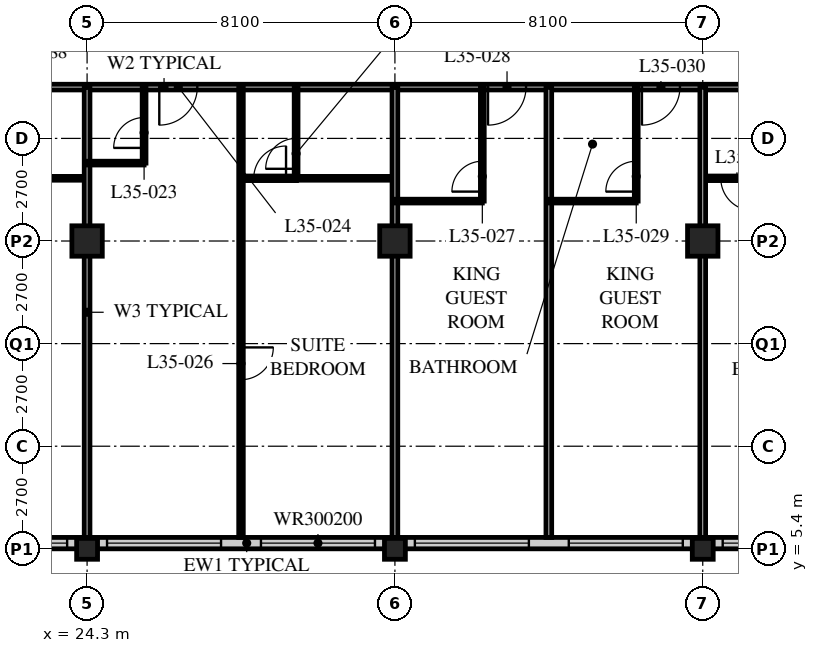
"""IFC4 building model, lengths in metres.
Left out: names, types, materials, properties, quantities, classifications, styles, units other than length and angle.
Written with IfcOpenShell. Run it as: python <this file> out.ifc"""

import sys

from ifc_helpers import new_model, si_unit, direction, frame, frame_2d, origin, origin_2d, place, context, subcontext, project, spatial, rectangle, hollow_rectangle, extrude, element, fill, save


model = new_model("IFC4")
c1 = context("Model", 3, precision=1e-05, world=origin(), true_north=direction((0.0, 1.0)))
c2 = subcontext(c1, "Body", "Model", "MODEL_VIEW")
j1 = project(units=[si_unit("LENGTHUNIT", "METRE"), si_unit("PLANEANGLEUNIT", "RADIAN")], contexts=[c1])
p1 = place(None, origin())
s1 = spatial("IfcSite", under=j1, at=p1, CompositionType="ELEMENT")
p2 = place(p1, origin())
s2 = spatial("IfcBuilding", under=s1, at=p2, CompositionType="ELEMENT")
p3 = place(p2, frame((0.0, 0.0, 137.4)))
s3 = spatial("IfcBuildingStorey", under=s2, at=p3, CompositionType="ELEMENT", Elevation=137.4)
p4 = place(p3, frame((24.3, 5.4, 0.0), z_axis=(0.0, 0.0, 1.0), x_axis=(1.0, 0.0, 0.0)))
e1 = element("IfcColumn", 1, at=p4, inside=s3, PredefinedType="COLUMN", context=c2, shape_type="SweptSolid", body=[
    extrude(hollow_rectangle(XDim=0.55, YDim=0.55, WallThickness=0.04, at=origin_2d()), origin(), (0.0, 0.0, 1.0), 3.4),
])
p5 = place(p3, frame((24.3, 13.5, 0.0), z_axis=(0.0, 0.0, 1.0), x_axis=(1.0, 0.0, 0.0)))
e2 = element("IfcColumn", 2, at=p5, inside=s3, PredefinedType="COLUMN", context=c2, shape_type="SweptSolid", body=[
    extrude(hollow_rectangle(XDim=0.8, YDim=0.8, WallThickness=0.08, at=origin_2d()), origin(), (0.0, 0.0, 1.0), 3.4),
])
p6 = place(p3, frame((32.4, 5.4, 0.0), z_axis=(0.0, 0.0, 1.0), x_axis=(1.0, 0.0, 0.0)))
e3 = element("IfcColumn", 3, at=p6, inside=s3, PredefinedType="COLUMN", context=c2, shape_type="SweptSolid", body=[
    extrude(hollow_rectangle(XDim=0.55, YDim=0.55, WallThickness=0.04, at=origin_2d()), origin(), (0.0, 0.0, 1.0), 3.4),
])
p7 = place(p3, frame((32.4, 13.5, 0.0), z_axis=(0.0, 0.0, 1.0), x_axis=(1.0, 0.0, 0.0)))
e4 = element("IfcColumn", 4, at=p7, inside=s3, PredefinedType="COLUMN", context=c2, shape_type="SweptSolid", body=[
    extrude(hollow_rectangle(XDim=0.8, YDim=0.8, WallThickness=0.08, at=origin_2d()), origin(), (0.0, 0.0, 1.0), 3.4),
])
p8 = place(p3, frame((40.5, 5.4, 0.0), z_axis=(0.0, 0.0, 1.0), x_axis=(1.0, 0.0, 0.0)))
e5 = element("IfcColumn", 5, at=p8, inside=s3, PredefinedType="COLUMN", context=c2, shape_type="SweptSolid", body=[
    extrude(hollow_rectangle(XDim=0.55, YDim=0.55, WallThickness=0.04, at=origin_2d()), origin(), (0.0, 0.0, 1.0), 3.4),
])
p9 = place(p3, frame((40.5, 13.5, 0.0), z_axis=(0.0, 0.0, 1.0), x_axis=(1.0, 0.0, 0.0)))
e6 = element("IfcColumn", 6, at=p9, inside=s3, PredefinedType="COLUMN", context=c2, shape_type="SweptSolid", body=[
    extrude(hollow_rectangle(XDim=0.8, YDim=0.8, WallThickness=0.08, at=origin_2d()), origin(), (0.0, 0.0, 1.0), 3.4),
])
p10 = place(p3, frame((8.4, 5.55, 0.0), z_axis=(0.0, 0.0, 1.0), x_axis=(1.0, 0.0, 0.0)))
e7 = element("IfcWall", 7, at=p10, inside=s3, PredefinedType="SOLIDWALL", context=c2, shape_type="SweptSolid", body=[
    extrude(rectangle(XDim=40.2, YDim=0.3, at=frame_2d((20.1, 0.0))), origin(), (0.0, 0.0, 1.0), 3.19),
])
p11 = place(p10, frame((0.225, 0.0, 0.9)))
e8 = element("IfcOpeningElement", 8, at=p11, cuts=e7, PredefinedType="OPENING", context=c2, shape_type="SweptSolid", body=[
    extrude(rectangle(XDim=3.0, YDim=2.0, at=frame_2d((1.5, 1.0))), frame((0.0, 0.16, 0.0), z_axis=(0.0, -1.0, 0.0), x_axis=(1.0, 0.0, 0.0)), (0.0, 0.0, 1.0), 0.32),
])
p12 = place(p10, frame((4.275, 0.0, 0.9)))
e9 = element("IfcOpeningElement", 9, at=p12, cuts=e7, PredefinedType="OPENING", context=c2, shape_type="SweptSolid", body=[
    extrude(rectangle(XDim=3.0, YDim=2.0, at=frame_2d((1.5, 1.0))), frame((0.0, 0.16, 0.0), z_axis=(0.0, -1.0, 0.0), x_axis=(1.0, 0.0, 0.0)), (0.0, 0.0, 1.0), 0.32),
])
p13 = place(p10, frame((8.325, 0.0, 0.9)))
e10 = element("IfcOpeningElement", 10, at=p13, cuts=e7, PredefinedType="OPENING", context=c2, shape_type="SweptSolid", body=[
    extrude(rectangle(XDim=3.0, YDim=2.0, at=frame_2d((1.5, 1.0))), frame((0.0, 0.16, 0.0), z_axis=(0.0, -1.0, 0.0), x_axis=(1.0, 0.0, 0.0)), (0.0, 0.0, 1.0), 0.32),
])
p14 = place(p10, frame((12.375, 0.0, 0.9)))
e11 = element("IfcOpeningElement", 11, at=p14, cuts=e7, PredefinedType="OPENING", context=c2, shape_type="SweptSolid", body=[
    extrude(rectangle(XDim=3.0, YDim=2.0, at=frame_2d((1.5, 1.0))), frame((0.0, 0.16, 0.0), z_axis=(0.0, -1.0, 0.0), x_axis=(1.0, 0.0, 0.0)), (0.0, 0.0, 1.0), 0.32),
])
p15 = place(p10, frame((16.425, 0.0, 0.9)))
e12 = element("IfcOpeningElement", 12, at=p15, cuts=e7, PredefinedType="OPENING", context=c2, shape_type="SweptSolid", body=[
    extrude(rectangle(XDim=3.0, YDim=2.0, at=frame_2d((1.5, 1.0))), frame((0.0, 0.16, 0.0), z_axis=(0.0, -1.0, 0.0), x_axis=(1.0, 0.0, 0.0)), (0.0, 0.0, 1.0), 0.32),
])
p16 = place(p10, frame((20.475, 0.0, 0.9)))
e13 = element("IfcOpeningElement", 13, at=p16, cuts=e7, PredefinedType="OPENING", context=c2, shape_type="SweptSolid", body=[
    extrude(rectangle(XDim=3.0, YDim=2.0, at=frame_2d((1.5, 1.0))), frame((0.0, 0.16, 0.0), z_axis=(0.0, -1.0, 0.0), x_axis=(1.0, 0.0, 0.0)), (0.0, 0.0, 1.0), 0.32),
])
p17 = place(p10, frame((24.525, 0.0, 0.9)))
e14 = element("IfcOpeningElement", 14, at=p17, cuts=e7, PredefinedType="OPENING", context=c2, shape_type="SweptSolid", body=[
    extrude(rectangle(XDim=3.0, YDim=2.0, at=frame_2d((1.5, 1.0))), frame((0.0, 0.16, 0.0), z_axis=(0.0, -1.0, 0.0), x_axis=(1.0, 0.0, 0.0)), (0.0, 0.0, 1.0), 0.32),
])
p18 = place(p10, frame((28.575, 0.0, 0.9)))
e15 = element("IfcOpeningElement", 15, at=p18, cuts=e7, PredefinedType="OPENING", context=c2, shape_type="SweptSolid", body=[
    extrude(rectangle(XDim=3.0, YDim=2.0, at=frame_2d((1.5, 1.0))), frame((0.0, 0.16, 0.0), z_axis=(0.0, -1.0, 0.0), x_axis=(1.0, 0.0, 0.0)), (0.0, 0.0, 1.0), 0.32),
])
p19 = place(p10, frame((32.625, 0.0, 0.9)))
e16 = element("IfcOpeningElement", 16, at=p19, cuts=e7, PredefinedType="OPENING", context=c2, shape_type="SweptSolid", body=[
    extrude(rectangle(XDim=3.0, YDim=2.0, at=frame_2d((1.5, 1.0))), frame((0.0, 0.16, 0.0), z_axis=(0.0, -1.0, 0.0), x_axis=(1.0, 0.0, 0.0)), (0.0, 0.0, 1.0), 0.32),
])
p20 = place(p10, frame((36.675, 0.0, 0.9)))
e17 = element("IfcOpeningElement", 17, at=p20, cuts=e7, PredefinedType="OPENING", context=c2, shape_type="SweptSolid", body=[
    extrude(rectangle(XDim=3.0, YDim=2.0, at=frame_2d((1.5, 1.0))), frame((0.0, 0.16, 0.0), z_axis=(0.0, -1.0, 0.0), x_axis=(1.0, 0.0, 0.0)), (0.0, 0.0, 1.0), 0.32),
])
p21 = place(p3, frame((8.1, 17.55, 0.0), z_axis=(0.0, 0.0, 1.0), x_axis=(1.0, 0.0, 0.0)))
e18 = element("IfcWall", 18, at=p21, inside=s3, PredefinedType="PARTITIONING", context=c2, shape_type="SweptSolid", body=[
    extrude(rectangle(XDim=36.45, YDim=0.15, at=frame_2d((18.225, 0.0))), origin(), (0.0, 0.0, 1.0), 3.19),
])
p22 = place(p21, frame((9.625, 0.0, 0.0)))
e19 = element("IfcOpeningElement", 19, at=p22, cuts=e18, PredefinedType="OPENING", context=c2, shape_type="SweptSolid", body=[
    extrude(rectangle(XDim=1.0, YDim=2.1, at=frame_2d((0.5, 1.05))), frame((0.0, 0.085, 0.0), z_axis=(0.0, -1.0, 0.0), x_axis=(1.0, 0.0, 0.0)), (0.0, 0.0, 1.0), 0.17),
])
p23 = place(p21, frame((18.1, 0.0, 0.0)))
e20 = element("IfcOpeningElement", 20, at=p23, cuts=e18, PredefinedType="OPENING", context=c2, shape_type="SweptSolid", body=[
    extrude(rectangle(XDim=1.0, YDim=2.1, at=frame_2d((0.5, 1.05))), frame((0.0, 0.085, 0.0), z_axis=(0.0, -1.0, 0.0), x_axis=(1.0, 0.0, 0.0)), (0.0, 0.0, 1.0), 0.17),
])
p24 = place(p21, frame((26.75, 0.0, 0.0)))
e21 = element("IfcOpeningElement", 21, at=p24, cuts=e18, PredefinedType="OPENING", context=c2, shape_type="SweptSolid", body=[
    extrude(rectangle(XDim=1.0, YDim=2.1, at=frame_2d((0.5, 1.05))), frame((0.0, 0.085, 0.0), z_axis=(0.0, -1.0, 0.0), x_axis=(1.0, 0.0, 0.0)), (0.0, 0.0, 1.0), 0.17),
])
p25 = place(p21, frame((30.8, 0.0, 0.0)))
e22 = element("IfcOpeningElement", 22, at=p25, cuts=e18, PredefinedType="OPENING", context=c2, shape_type="SweptSolid", body=[
    extrude(rectangle(XDim=1.0, YDim=2.1, at=frame_2d((0.5, 1.05))), frame((0.0, 0.085, 0.0), z_axis=(0.0, -1.0, 0.0), x_axis=(1.0, 0.0, 0.0)), (0.0, 0.0, 1.0), 0.17),
])
p26 = place(p21, frame((1.525, 0.0, 0.0)))
e23 = element("IfcOpeningElement", 23, at=p26, cuts=e18, PredefinedType="OPENING", context=c2, shape_type="SweptSolid", body=[
    extrude(rectangle(XDim=1.0, YDim=2.1, at=frame_2d((0.5, 1.05))), frame((0.0, 0.085, 0.0), z_axis=(0.0, -1.0, 0.0), x_axis=(1.0, 0.0, 0.0)), (0.0, 0.0, 1.0), 0.17),
])
p27 = place(p21, frame((33.925, 0.0, 0.0)))
e24 = element("IfcOpeningElement", 24, at=p27, cuts=e18, PredefinedType="OPENING", context=c2, shape_type="SweptSolid", body=[
    extrude(rectangle(XDim=1.0, YDim=2.1, at=frame_2d((0.5, 1.05))), frame((0.0, 0.085, 0.0), z_axis=(0.0, -1.0, 0.0), x_axis=(1.0, 0.0, 0.0)), (0.0, 0.0, 1.0), 0.17),
])
p28 = place(p3, frame((21.7, 15.15, 0.0), z_axis=(0.0, 0.0, 1.0), x_axis=(1.0, 0.0, 0.0)))
e25 = element("IfcWall", 25, at=p28, inside=s3, PredefinedType="PARTITIONING", context=c2, shape_type="SweptSolid", body=[
    extrude(rectangle(XDim=2.6, YDim=0.1, at=frame_2d((1.3, 0.0))), origin(), (0.0, 0.0, 1.0), 3.19),
])
p29 = place(p3, frame((24.3, 17.55, 0.0), z_axis=(0.0, 0.0, 1.0), x_axis=(0.0, -1.0, 0.0)))
e26 = element("IfcWall", 26, at=p29, inside=s3, PredefinedType="PARTITIONING", context=c2, shape_type="SweptSolid", body=[
    extrude(rectangle(XDim=11.85, YDim=0.15, at=frame_2d((5.925, 0.0))), origin(), (0.0, 0.0, 1.0), 2.578),
])
p30 = place(p3, frame((24.3, 15.55, 0.0), z_axis=(0.0, 0.0, 1.0), x_axis=(1.0, 0.0, 0.0)))
e27 = element("IfcWall", 27, at=p30, inside=s3, PredefinedType="PARTITIONING", context=c2, shape_type="SweptSolid", body=[
    extrude(rectangle(XDim=1.5, YDim=0.1, at=frame_2d((0.75, 0.0))), origin(), (0.0, 0.0, 1.0), 3.19),
])
p31 = place(p3, frame((25.8, 17.55, 0.0), z_axis=(0.0, 0.0, 1.0), x_axis=(0.0, -1.0, 0.0)))
e28 = element("IfcWall", 28, at=p31, inside=s3, PredefinedType="PARTITIONING", context=c2, shape_type="SweptSolid", body=[
    extrude(rectangle(XDim=2.0, YDim=0.1, at=frame_2d((1.0, 0.0))), origin(), (0.0, 0.0, 1.0), 3.19),
])
p32 = place(p31, frame((0.8, 0.0, 0.0)))
e29 = element("IfcOpeningElement", 29, at=p32, cuts=e28, PredefinedType="OPENING", context=c2, shape_type="SweptSolid", body=[
    extrude(rectangle(XDim=0.8, YDim=2.1, at=frame_2d((0.4, 1.05))), frame((0.0, 0.06, 0.0), z_axis=(0.0, -1.0, 0.0), x_axis=(1.0, 0.0, 0.0)), (0.0, 0.0, 1.0), 0.12),
])
p33 = place(p3, frame((29.8, 15.15, 0.0), z_axis=(0.0, 0.0, 1.0), x_axis=(1.0, 0.0, 0.0)))
e30 = element("IfcWall", 30, at=p33, inside=s3, PredefinedType="PARTITIONING", context=c2, shape_type="SweptSolid", body=[
    extrude(rectangle(XDim=2.6, YDim=0.1, at=frame_2d((1.3, 0.0))), origin(), (0.0, 0.0, 1.0), 3.19),
])
p34 = place(p3, frame((29.8, 17.55, 0.0), z_axis=(0.0, 0.0, 1.0), x_axis=(0.0, -1.0, 0.0)))
e31 = element("IfcWall", 31, at=p34, inside=s3, PredefinedType="PARTITIONING", context=c2, shape_type="SweptSolid", body=[
    extrude(rectangle(XDim=2.4, YDim=0.1, at=frame_2d((1.2, 0.0))), origin(), (0.0, 0.0, 1.0), 3.19),
])
p35 = place(p34, frame((1.35, 0.0, 0.0)))
e32 = element("IfcOpeningElement", 32, at=p35, cuts=e31, PredefinedType="OPENING", context=c2, shape_type="SweptSolid", body=[
    extrude(rectangle(XDim=0.8, YDim=2.1, at=frame_2d((0.4, 1.05))), frame((0.0, 0.06, 0.0), z_axis=(0.0, -1.0, 0.0), x_axis=(1.0, 0.0, 0.0)), (0.0, 0.0, 1.0), 0.12),
])
p36 = place(p3, frame((28.35, 17.55, 0.0), z_axis=(0.0, 0.0, 1.0), x_axis=(0.0, -1.0, 0.0)))
e33 = element("IfcWall", 33, at=p36, inside=s3, PredefinedType="PARTITIONING", context=c2, shape_type="SweptSolid", body=[
    extrude(rectangle(XDim=11.85, YDim=0.12, at=frame_2d((5.925, 0.0))), origin(), (0.0, 0.0, 1.0), 3.19),
])
p37 = place(p36, frame((6.85, 0.0, 0.0)))
e34 = element("IfcOpeningElement", 34, at=p37, cuts=e33, PredefinedType="OPENING", context=c2, shape_type="SweptSolid", body=[
    extrude(rectangle(XDim=0.85, YDim=2.1, at=frame_2d((0.425, 1.05))), frame((0.0, 0.07, 0.0), z_axis=(0.0, -1.0, 0.0), x_axis=(1.0, 0.0, 0.0)), (0.0, 0.0, 1.0), 0.14),
])
p38 = place(p3, frame((32.4, 17.55, 0.0), z_axis=(0.0, 0.0, 1.0), x_axis=(0.0, -1.0, 0.0)))
e35 = element("IfcWall", 35, at=p38, inside=s3, PredefinedType="PARTITIONING", context=c2, shape_type="SweptSolid", body=[
    extrude(rectangle(XDim=11.85, YDim=0.15, at=frame_2d((5.925, 0.0))), origin(), (0.0, 0.0, 1.0), 2.578),
])
p39 = place(p3, frame((32.4, 14.55, 0.0), z_axis=(0.0, 0.0, 1.0), x_axis=(1.0, 0.0, 0.0)))
e36 = element("IfcWall", 36, at=p39, inside=s3, PredefinedType="PARTITIONING", context=c2, shape_type="SweptSolid", body=[
    extrude(rectangle(XDim=2.3, YDim=0.1, at=frame_2d((1.15, 0.0))), origin(), (0.0, 0.0, 1.0), 3.19),
])
p40 = place(p3, frame((34.7, 17.55, 0.0), z_axis=(0.0, 0.0, 1.0), x_axis=(0.0, -1.0, 0.0)))
e37 = element("IfcWall", 37, at=p40, inside=s3, PredefinedType="PARTITIONING", context=c2, shape_type="SweptSolid", body=[
    extrude(rectangle(XDim=3.0, YDim=0.1, at=frame_2d((1.5, 0.0))), origin(), (0.0, 0.0, 1.0), 3.19),
])
p41 = place(p40, frame((1.95, 0.0, 0.0)))
e38 = element("IfcOpeningElement", 38, at=p41, cuts=e37, PredefinedType="OPENING", context=c2, shape_type="SweptSolid", body=[
    extrude(rectangle(XDim=0.8, YDim=2.1, at=frame_2d((0.4, 1.05))), frame((0.0, 0.06, 0.0), z_axis=(0.0, -1.0, 0.0), x_axis=(1.0, 0.0, 0.0)), (0.0, 0.0, 1.0), 0.12),
])
p42 = place(p3, frame((36.45, 17.55, 0.0), z_axis=(0.0, 0.0, 1.0), x_axis=(0.0, -1.0, 0.0)))
e39 = element("IfcWall", 39, at=p42, inside=s3, PredefinedType="PARTITIONING", context=c2, shape_type="SweptSolid", body=[
    extrude(rectangle(XDim=11.85, YDim=0.15, at=frame_2d((5.925, 0.0))), origin(), (0.0, 0.0, 1.0), 3.19),
])
p43 = place(p3, frame((36.45, 14.55, 0.0), z_axis=(0.0, 0.0, 1.0), x_axis=(1.0, 0.0, 0.0)))
e40 = element("IfcWall", 40, at=p43, inside=s3, PredefinedType="PARTITIONING", context=c2, shape_type="SweptSolid", body=[
    extrude(rectangle(XDim=2.3, YDim=0.1, at=frame_2d((1.15, 0.0))), origin(), (0.0, 0.0, 1.0), 3.19),
])
p44 = place(p3, frame((38.75, 17.55, 0.0), z_axis=(0.0, 0.0, 1.0), x_axis=(0.0, -1.0, 0.0)))
e41 = element("IfcWall", 41, at=p44, inside=s3, PredefinedType="PARTITIONING", context=c2, shape_type="SweptSolid", body=[
    extrude(rectangle(XDim=3.0, YDim=0.1, at=frame_2d((1.5, 0.0))), origin(), (0.0, 0.0, 1.0), 3.19),
])
p45 = place(p44, frame((1.95, 0.0, 0.0)))
e42 = element("IfcOpeningElement", 42, at=p45, cuts=e41, PredefinedType="OPENING", context=c2, shape_type="SweptSolid", body=[
    extrude(rectangle(XDim=0.8, YDim=2.1, at=frame_2d((0.4, 1.05))), frame((0.0, 0.06, 0.0), z_axis=(0.0, -1.0, 0.0), x_axis=(1.0, 0.0, 0.0)), (0.0, 0.0, 1.0), 0.12),
])
p46 = place(p3, frame((40.5, 15.15, 0.0), z_axis=(0.0, 0.0, 1.0), x_axis=(1.0, 0.0, 0.0)))
e43 = element("IfcWall", 43, at=p46, inside=s3, PredefinedType="PARTITIONING", context=c2, shape_type="SweptSolid", body=[
    extrude(rectangle(XDim=8.05, YDim=0.12, at=frame_2d((4.025, 0.0))), origin(), (0.0, 0.0, 1.0), 3.19),
])
p47 = place(p46, frame((0.475, 0.0, 0.0)))
e44 = element("IfcOpeningElement", 44, at=p47, cuts=e43, PredefinedType="OPENING", context=c2, shape_type="SweptSolid", body=[
    extrude(rectangle(XDim=0.85, YDim=2.1, at=frame_2d((0.425, 1.05))), frame((0.0, 0.07, 0.0), z_axis=(0.0, -1.0, 0.0), x_axis=(1.0, 0.0, 0.0)), (0.0, 0.0, 1.0), 0.14),
])
p48 = place(p46, frame((4.325, 0.0, 0.0)))
e45 = element("IfcOpeningElement", 45, at=p48, cuts=e43, PredefinedType="OPENING", context=c2, shape_type="SweptSolid", body=[
    extrude(rectangle(XDim=0.85, YDim=2.1, at=frame_2d((0.425, 1.05))), frame((0.0, 0.07, 0.0), z_axis=(0.0, -1.0, 0.0), x_axis=(1.0, 0.0, 0.0)), (0.0, 0.0, 1.0), 0.14),
])
p49 = place(p3, frame((40.5, 17.55, 0.0), z_axis=(0.0, 0.0, 1.0), x_axis=(0.0, -1.0, 0.0)))
e46 = element("IfcWall", 46, at=p49, inside=s3, PredefinedType="PARTITIONING", context=c2, shape_type="SweptSolid", body=[
    extrude(rectangle(XDim=11.85, YDim=0.15, at=frame_2d((5.925, 0.0))), origin(), (0.0, 0.0, 1.0), 2.578),
])
p50 = place(p3, frame((29.81, 15.15, 0.0), z_axis=(0.0, 0.0, 1.0), x_axis=(-1.0, 0.0, 0.0)))
e47 = element("IfcWall", 47, at=p50, inside=s3, PredefinedType="PARTITIONING", context=c2, shape_type="SweptSolid", body=[
    extrude(rectangle(XDim=1.46, YDim=0.12, at=frame_2d((0.73, 0.0))), origin(), (0.0, 0.0, 1.0), 3.19),
])
p51 = place(p50, frame((0.275, 0.0, 0.0)))
e48 = element("IfcOpeningElement", 48, at=p51, cuts=e47, PredefinedType="OPENING", context=c2, shape_type="SweptSolid", body=[
    extrude(rectangle(XDim=0.85, YDim=2.1, at=frame_2d((0.425, 1.05))), frame((0.0, 0.07, 0.0), z_axis=(0.0, -1.0, 0.0), x_axis=(1.0, 0.0, 0.0)), (0.0, 0.0, 1.0), 0.14),
])
p52 = place(p14, origin())
e49 = element("IfcWindow", 49, at=p52, inside=s3, PartitioningType="SINGLE_PANEL", PredefinedType="WINDOW", context=c2, shape_type="SweptSolid", body=[
    extrude(rectangle(XDim=3.0, YDim=2.0, at=frame_2d((1.5, 1.0))), frame((0.0, 0.03, 0.0), z_axis=(0.0, -1.0, 0.0), x_axis=(1.0, 0.0, 0.0)), (0.0, 0.0, 1.0), 0.06),
])
fill(e11, e49)
p53 = place(p15, origin())
e50 = element("IfcWindow", 50, at=p53, inside=s3, PartitioningType="SINGLE_PANEL", PredefinedType="WINDOW", context=c2, shape_type="SweptSolid", body=[
    extrude(rectangle(XDim=3.0, YDim=2.0, at=frame_2d((1.5, 1.0))), frame((0.0, 0.03, 0.0), z_axis=(0.0, -1.0, 0.0), x_axis=(1.0, 0.0, 0.0)), (0.0, 0.0, 1.0), 0.06),
])
fill(e12, e50)
p54 = place(p16, origin())
e51 = element("IfcWindow", 51, at=p54, inside=s3, PartitioningType="SINGLE_PANEL", PredefinedType="WINDOW", context=c2, shape_type="SweptSolid", body=[
    extrude(rectangle(XDim=3.0, YDim=2.0, at=frame_2d((1.5, 1.0))), frame((0.0, 0.03, 0.0), z_axis=(0.0, -1.0, 0.0), x_axis=(1.0, 0.0, 0.0)), (0.0, 0.0, 1.0), 0.06),
])
fill(e13, e51)
p55 = place(p17, origin())
e52 = element("IfcWindow", 52, at=p55, inside=s3, PartitioningType="SINGLE_PANEL", PredefinedType="WINDOW", context=c2, shape_type="SweptSolid", body=[
    extrude(rectangle(XDim=3.0, YDim=2.0, at=frame_2d((1.5, 1.0))), frame((0.0, 0.03, 0.0), z_axis=(0.0, -1.0, 0.0), x_axis=(1.0, 0.0, 0.0)), (0.0, 0.0, 1.0), 0.06),
])
fill(e14, e52)
p56 = place(p18, origin())
e53 = element("IfcWindow", 53, at=p56, inside=s3, PartitioningType="SINGLE_PANEL", PredefinedType="WINDOW", context=c2, shape_type="SweptSolid", body=[
    extrude(rectangle(XDim=3.0, YDim=2.0, at=frame_2d((1.5, 1.0))), frame((0.0, 0.03, 0.0), z_axis=(0.0, -1.0, 0.0), x_axis=(1.0, 0.0, 0.0)), (0.0, 0.0, 1.0), 0.06),
])
fill(e15, e53)
p57 = place(p19, origin())
e54 = element("IfcWindow", 54, at=p57, inside=s3, PartitioningType="SINGLE_PANEL", PredefinedType="WINDOW", context=c2, shape_type="SweptSolid", body=[
    extrude(rectangle(XDim=3.0, YDim=2.0, at=frame_2d((1.5, 1.0))), frame((0.0, 0.03, 0.0), z_axis=(0.0, -1.0, 0.0), x_axis=(1.0, 0.0, 0.0)), (0.0, 0.0, 1.0), 0.06),
])
fill(e16, e54)
p58 = place(p32, origin())
e55 = element("IfcDoor", 55, at=p58, inside=s3, OperationType="SINGLE_SWING_LEFT", PredefinedType="DOOR", context=c2, shape_type="SweptSolid", body=[
    extrude(rectangle(XDim=0.8, YDim=2.1, at=frame_2d((0.4, 1.05))), frame((0.0, 0.025, 0.0), z_axis=(0.0, -1.0, 0.0), x_axis=(1.0, 0.0, 0.0)), (0.0, 0.0, 1.0), 0.05),
])
fill(e29, e55)
p59 = place(p23, origin())
e56 = element("IfcDoor", 56, at=p59, inside=s3, OperationType="SINGLE_SWING_RIGHT", PredefinedType="DOOR", context=c2, shape_type="SweptSolid", body=[
    extrude(rectangle(XDim=1.0, YDim=2.1, at=frame_2d((0.5, 1.05))), frame((0.0, 0.025, 0.0), z_axis=(0.0, -1.0, 0.0), x_axis=(1.0, 0.0, 0.0)), (0.0, 0.0, 1.0), 0.05),
])
fill(e20, e56)
p60 = place(p35, origin())
e57 = element("IfcDoor", 57, at=p60, inside=s3, OperationType="SINGLE_SWING_LEFT", PredefinedType="DOOR", context=c2, shape_type="SweptSolid", body=[
    extrude(rectangle(XDim=0.8, YDim=2.1, at=frame_2d((0.4, 1.05))), frame((0.0, 0.025, 0.0), z_axis=(0.0, -1.0, 0.0), x_axis=(1.0, 0.0, 0.0)), (0.0, 0.0, 1.0), 0.05),
])
fill(e32, e57)
p61 = place(p37, origin())
e58 = element("IfcDoor", 58, at=p61, inside=s3, OperationType="SINGLE_SWING_LEFT", PredefinedType="DOOR", context=c2, shape_type="SweptSolid", body=[
    extrude(rectangle(XDim=0.85, YDim=2.1, at=frame_2d((0.425, 1.05))), frame((0.0, 0.025, 0.0), z_axis=(0.0, -1.0, 0.0), x_axis=(1.0, 0.0, 0.0)), (0.0, 0.0, 1.0), 0.05),
])
fill(e34, e58)
p62 = place(p41, origin())
e59 = element("IfcDoor", 59, at=p62, inside=s3, OperationType="SINGLE_SWING_LEFT", PredefinedType="DOOR", context=c2, shape_type="SweptSolid", body=[
    extrude(rectangle(XDim=0.8, YDim=2.1, at=frame_2d((0.4, 1.05))), frame((0.0, 0.025, 0.0), z_axis=(0.0, -1.0, 0.0), x_axis=(1.0, 0.0, 0.0)), (0.0, 0.0, 1.0), 0.05),
])
fill(e38, e59)
p63 = place(p24, origin())
e60 = element("IfcDoor", 60, at=p63, inside=s3, OperationType="SINGLE_SWING_RIGHT", PredefinedType="DOOR", context=c2, shape_type="SweptSolid", body=[
    extrude(rectangle(XDim=1.0, YDim=2.1, at=frame_2d((0.5, 1.05))), frame((0.0, 0.025, 0.0), z_axis=(0.0, -1.0, 0.0), x_axis=(1.0, 0.0, 0.0)), (0.0, 0.0, 1.0), 0.05),
])
fill(e21, e60)
p64 = place(p45, origin())
e61 = element("IfcDoor", 61, at=p64, inside=s3, OperationType="SINGLE_SWING_LEFT", PredefinedType="DOOR", context=c2, shape_type="SweptSolid", body=[
    extrude(rectangle(XDim=0.8, YDim=2.1, at=frame_2d((0.4, 1.05))), frame((0.0, 0.025, 0.0), z_axis=(0.0, -1.0, 0.0), x_axis=(1.0, 0.0, 0.0)), (0.0, 0.0, 1.0), 0.05),
])
fill(e42, e61)
p65 = place(p25, origin())
e62 = element("IfcDoor", 62, at=p65, inside=s3, OperationType="SINGLE_SWING_RIGHT", PredefinedType="DOOR", context=c2, shape_type="SweptSolid", body=[
    extrude(rectangle(XDim=1.0, YDim=2.1, at=frame_2d((0.5, 1.05))), frame((0.0, 0.025, 0.0), z_axis=(0.0, -1.0, 0.0), x_axis=(1.0, 0.0, 0.0)), (0.0, 0.0, 1.0), 0.05),
])
fill(e22, e62)
p66 = place(p47, origin())
e63 = element("IfcDoor", 63, at=p66, inside=s3, OperationType="SINGLE_SWING_LEFT", PredefinedType="DOOR", context=c2, shape_type="SweptSolid", body=[
    extrude(rectangle(XDim=0.85, YDim=2.1, at=frame_2d((0.425, 1.05))), frame((0.0, 0.025, 0.0), z_axis=(0.0, -1.0, 0.0), x_axis=(1.0, 0.0, 0.0)), (0.0, 0.0, 1.0), 0.05),
])
fill(e44, e63)
p67 = place(p51, origin())
e64 = element("IfcDoor", 64, at=p67, inside=s3, OperationType="SINGLE_SWING_RIGHT", PredefinedType="DOOR", context=c2, shape_type="SweptSolid", body=[
    extrude(rectangle(XDim=0.85, YDim=2.1, at=frame_2d((0.425, 1.05))), frame((0.0, 0.025, 0.0), z_axis=(0.0, -1.0, 0.0), x_axis=(1.0, 0.0, 0.0)), (0.0, 0.0, 1.0), 0.05),
])
fill(e48, e64)
save(model, sys.argv[1])
